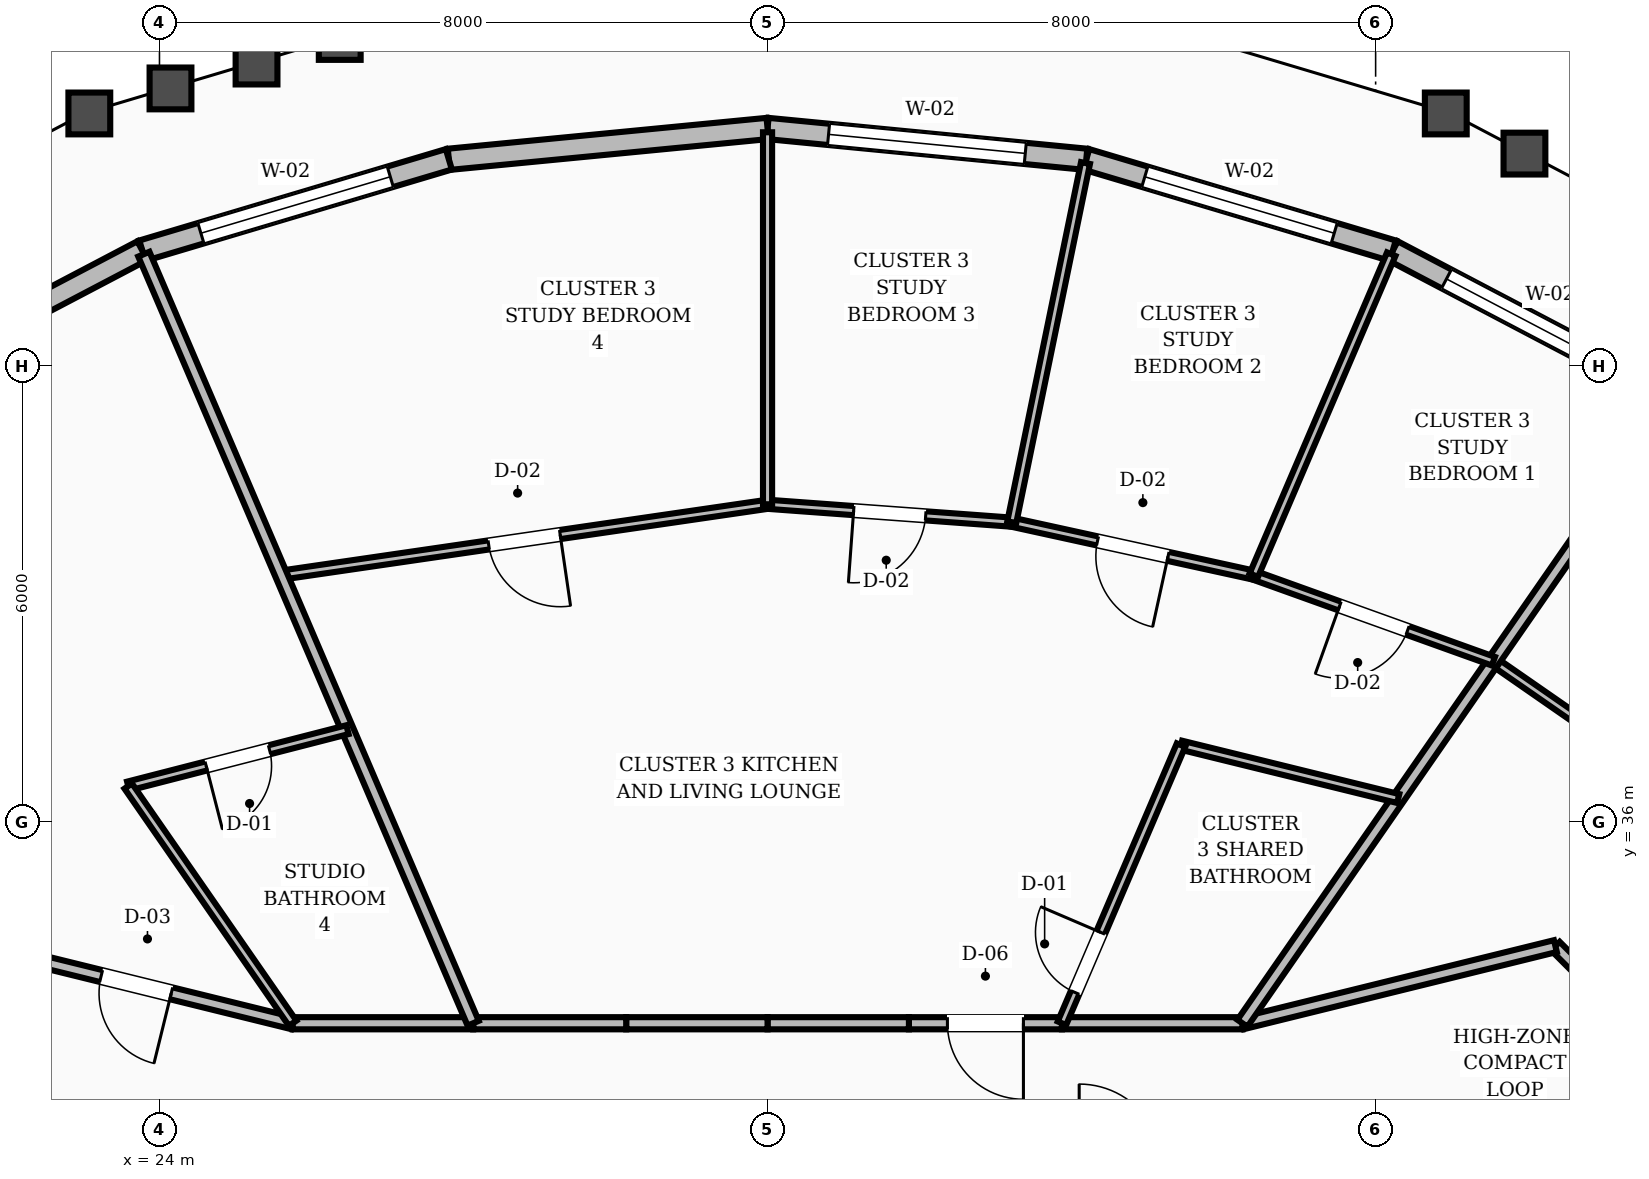
"""IFC4 building model, lengths in metres.
Left out: names, types, materials, properties, quantities, classifications, styles, units other than length and angle.
Written with IfcOpenShell. Run it as: python <this file> out.ifc"""

import sys

from ifc_helpers import new_model, si_unit, direction, frame, frame_2d, origin, place, context, subcontext, project, spatial, rectangle, extrude, element, fill, save


model = new_model("IFC4")
c1 = context("Model", 3, precision=1e-05, world=origin(), true_north=direction((0.0, 1.0)))
c2 = subcontext(c1, "Body", "Model", "MODEL_VIEW")
j1 = project(units=[si_unit("LENGTHUNIT", "METRE"), si_unit("PLANEANGLEUNIT", "RADIAN")], contexts=[c1])
p1 = place(None, origin())
s1 = spatial("IfcSite", under=j1, at=p1, CompositionType="ELEMENT")
p2 = place(p1, origin())
s2 = spatial("IfcBuilding", under=s1, at=p2, CompositionType="ELEMENT")
p3 = place(p2, frame((0.0, 0.0, 243.6)))
s3 = spatial("IfcBuildingStorey", under=s2, at=p3, CompositionType="ELEMENT", Elevation=243.6)
p4 = place(p3, frame((43.941, 41.562, 0.0), z_axis=(0.0, 0.0, 1.0), x_axis=(-0.885290153249, 0.46503907853, 0.0)))
e1 = element("IfcWall", 1, at=p4, inside=s3, PredefinedType="STANDARD", context=c2, shape_type="SweptSolid", body=[
    extrude(rectangle(XDim=4.197, YDim=0.28, at=frame_2d((2.099, 0.0))), origin(), (0.0, 0.0, 1.0), 2.88),
])
p5 = place(p4, frame((0.799, 0.0, 0.8)))
e2 = element("IfcOpeningElement", 2, at=p5, cuts=e1, PredefinedType="OPENING", context=c2, shape_type="SweptSolid", body=[
    extrude(rectangle(XDim=2.6, YDim=1.65, at=frame_2d((1.3, 0.825))), frame((0.0, 0.15, 0.0), z_axis=(0.0, -1.0, 0.0), x_axis=(1.0, 0.0, 0.0)), (0.0, 0.0, 1.0), 0.3),
])
p6 = place(p3, frame((40.225, 43.514, 0.0), z_axis=(0.0, 0.0, 1.0), x_axis=(-0.958312014412, 0.285723788009, 0.0)))
e3 = element("IfcWall", 3, at=p6, inside=s3, PredefinedType="STANDARD", context=c2, shape_type="SweptSolid", body=[
    extrude(rectangle(XDim=4.207, YDim=0.28, at=frame_2d((2.104, 0.0))), origin(), (0.0, 0.0, 1.0), 2.88),
])
p7 = place(p6, frame((0.804, 0.0, 0.8)))
e4 = element("IfcOpeningElement", 4, at=p7, cuts=e3, PredefinedType="OPENING", context=c2, shape_type="SweptSolid", body=[
    extrude(rectangle(XDim=2.6, YDim=1.65, at=frame_2d((1.3, 0.825))), frame((0.0, 0.15, 0.0), z_axis=(0.0, -1.0, 0.0), x_axis=(1.0, 0.0, 0.0)), (0.0, 0.0, 1.0), 0.3),
])
p8 = place(p3, frame((36.193, 44.716, 0.0), z_axis=(0.0, 0.0, 1.0), x_axis=(-0.995350551252, 0.096318638497, 0.0)))
e5 = element("IfcWall", 5, at=p8, inside=s3, PredefinedType="STANDARD", context=c2, shape_type="SweptSolid", body=[
    extrude(rectangle(XDim=4.213, YDim=0.28, at=frame_2d((2.106, 0.0))), origin(), (0.0, 0.0, 1.0), 2.88),
])
p9 = place(p8, frame((0.806, 0.0, 0.8)))
e6 = element("IfcOpeningElement", 6, at=p9, cuts=e5, PredefinedType="OPENING", context=c2, shape_type="SweptSolid", body=[
    extrude(rectangle(XDim=2.6, YDim=1.65, at=frame_2d((1.3, 0.825))), frame((0.0, 0.15, 0.0), z_axis=(0.0, -1.0, 0.0), x_axis=(1.0, 0.0, 0.0)), (0.0, 0.0, 1.0), 0.3),
])
p10 = place(p3, frame((32.0, 45.122, 0.0), z_axis=(0.0, 0.0, 1.0), x_axis=(-0.995350551252, -0.096318638497, 0.0)))
e7 = element("IfcWall", 7, at=p10, inside=s3, PredefinedType="STANDARD", context=c2, shape_type="SweptSolid", body=[
    extrude(rectangle(XDim=4.213, YDim=0.28, at=frame_2d((2.106, 0.0))), origin(), (0.0, 0.0, 1.0), 2.88),
])
p11 = place(p3, frame((27.807, 44.716, 0.0), z_axis=(0.0, 0.0, 1.0), x_axis=(-0.958312014412, -0.285723788009, 0.0)))
e8 = element("IfcWall", 8, at=p11, inside=s3, PredefinedType="STANDARD", context=c2, shape_type="SweptSolid", body=[
    extrude(rectangle(XDim=4.207, YDim=0.28, at=frame_2d((2.104, 0.0))), origin(), (0.0, 0.0, 1.0), 2.88),
])
p12 = place(p11, frame((0.804, 0.0, 0.8)))
e9 = element("IfcOpeningElement", 9, at=p12, cuts=e8, PredefinedType="OPENING", context=c2, shape_type="SweptSolid", body=[
    extrude(rectangle(XDim=2.6, YDim=1.65, at=frame_2d((1.3, 0.825))), frame((0.0, 0.15, 0.0), z_axis=(0.0, -1.0, 0.0), x_axis=(1.0, 0.0, 0.0)), (0.0, 0.0, 1.0), 0.3),
])
p13 = place(p3, frame((23.775, 43.514, 0.0), z_axis=(0.0, 0.0, 1.0), x_axis=(-0.885290153249, -0.46503907853, 0.0)))
e10 = element("IfcWall", 10, at=p13, inside=s3, PredefinedType="STANDARD", context=c2, shape_type="SweptSolid", body=[
    extrude(rectangle(XDim=4.197, YDim=0.28, at=frame_2d((2.099, 0.0))), origin(), (0.0, 0.0, 1.0), 2.88),
])
p14 = place(p3, frame((44.427, 32.303, 0.0), z_axis=(0.0, 0.0, 1.0), x_axis=(-0.707106781187, 0.707106781187, 0.0)))
e11 = element("IfcWall", 11, at=p14, inside=s3, PredefinedType="SOLIDWALL", context=c2, shape_type="SweptSolid", body=[
    extrude(rectangle(XDim=2.916, YDim=0.16, at=frame_2d((1.458, 0.0))), origin(), (0.0, 0.0, 1.0), 2.87),
])
p15 = place(p3, frame((42.365, 34.365, 0.0), z_axis=(0.0, 0.0, 1.0), x_axis=(-0.970939799552, -0.239323850978, 0.0)))
e12 = element("IfcWall", 12, at=p15, inside=s3, PredefinedType="SOLIDWALL", context=c2, shape_type="SweptSolid", body=[
    extrude(rectangle(XDim=4.241, YDim=0.16, at=frame_2d((2.12, 0.0))), origin(), (0.0, 0.0, 1.0), 2.87),
])
p16 = place(p3, frame((38.248, 33.35, 0.0), z_axis=(0.0, 0.0, 1.0), x_axis=(-1.0, 0.0, 0.0)))
e13 = element("IfcWall", 13, at=p16, inside=s3, PredefinedType="SOLIDWALL", context=c2, shape_type="SweptSolid", body=[
    extrude(rectangle(XDim=2.375, YDim=0.16, at=frame_2d((1.188, 0.0))), origin(), (0.0, 0.0, 1.0), 2.87),
])
p17 = place(p3, frame((35.873, 33.35, 0.0), z_axis=(0.0, 0.0, 1.0), x_axis=(-1.0, 0.0, 0.0)))
e14 = element("IfcWall", 14, at=p17, inside=s3, PredefinedType="SOLIDWALL", context=c2, shape_type="SweptSolid", body=[
    extrude(rectangle(XDim=2.013, YDim=0.16, at=frame_2d((1.006, 0.0))), origin(), (0.0, 0.0, 1.0), 2.87),
])
p18 = place(p17, frame((0.507, 0.0, 0.0)))
e15 = element("IfcOpeningElement", 15, at=p18, cuts=e14, PredefinedType="OPENING", context=c2, shape_type="SweptSolid", body=[
    extrude(rectangle(XDim=1.0, YDim=2.1, at=frame_2d((0.5, 1.05))), frame((0.0, 0.09, 0.0), z_axis=(0.0, -1.0, 0.0), x_axis=(1.0, 0.0, 0.0)), (0.0, 0.0, 1.0), 0.18),
])
for number, where, z_axis, x_axis in (
    (16, (33.86, 33.35, 0.0), (0.0, 0.0, 1.0), (-1.0, 0.0, 0.0)),
    (17, (32.0, 33.35, 0.0), (0.0, 0.0, 1.0), (-1.0, 0.0, 0.0)),
):
    element("IfcWall", number, at=place(p3, frame(where, z_axis=z_axis, x_axis=x_axis)), inside=s3, PredefinedType="SOLIDWALL", context=c2, shape_type="SweptSolid", body=[
        extrude(rectangle(XDim=1.86, YDim=0.16, at=frame_2d((0.93, 0.0))), origin(), (0.0, 0.0, 1.0), 2.87),
    ])
p19 = place(p3, frame((30.14, 33.35, 0.0), z_axis=(0.0, 0.0, 1.0), x_axis=(-1.0, 0.0, 0.0)))
e18 = element("IfcWall", 18, at=p19, inside=s3, PredefinedType="SOLIDWALL", context=c2, shape_type="SweptSolid", body=[
    extrude(rectangle(XDim=2.013, YDim=0.16, at=frame_2d((1.006, 0.0))), origin(), (0.0, 0.0, 1.0), 2.87),
])
p20 = place(p3, frame((28.127, 33.35, 0.0), z_axis=(0.0, 0.0, 1.0), x_axis=(-1.0, 0.0, 0.0)))
e19 = element("IfcWall", 19, at=p20, inside=s3, PredefinedType="SOLIDWALL", context=c2, shape_type="SweptSolid", body=[
    extrude(rectangle(XDim=2.375, YDim=0.16, at=frame_2d((1.188, 0.0))), origin(), (0.0, 0.0, 1.0), 2.87),
])
p21 = place(p3, frame((25.752, 33.35, 0.0), z_axis=(0.0, 0.0, 1.0), x_axis=(-0.970939799552, 0.239323850978, 0.0)))
e20 = element("IfcWall", 20, at=p21, inside=s3, PredefinedType="SOLIDWALL", context=c2, shape_type="SweptSolid", body=[
    extrude(rectangle(XDim=4.241, YDim=0.16, at=frame_2d((2.12, 0.0))), origin(), (0.0, 0.0, 1.0), 2.87),
])
p22 = place(p21, frame((1.646, 0.0, 0.0)))
e21 = element("IfcOpeningElement", 21, at=p22, cuts=e20, PredefinedType="OPENING", context=c2, shape_type="SweptSolid", body=[
    extrude(rectangle(XDim=0.95, YDim=2.1, at=frame_2d((0.475, 1.05))), frame((0.0, 0.09, 0.0), z_axis=(0.0, -1.0, 0.0), x_axis=(1.0, 0.0, 0.0)), (0.0, 0.0, 1.0), 0.18),
])
p23 = place(p3, frame((47.314, 34.113, 0.0), z_axis=(0.0, 0.0, 1.0), x_axis=(-0.821574143978, 0.570101680358, 0.0)))
e22 = element("IfcWall", 22, at=p23, inside=s3, PredefinedType="PARTITIONING", context=c2, shape_type="SweptSolid", body=[
    extrude(rectangle(XDim=7.016, YDim=0.12, at=frame_2d((3.508, 0.0))), origin(), (0.0, 0.0, 1.0), 2.87),
])
p24 = place(p23, frame((3.033, 0.0, 0.0)))
e23 = element("IfcOpeningElement", 23, at=p24, cuts=e22, PredefinedType="OPENING", context=c2, shape_type="SweptSolid", body=[
    extrude(rectangle(XDim=0.95, YDim=2.1, at=frame_2d((0.475, 1.05))), frame((0.0, 0.07, 0.0), z_axis=(0.0, -1.0, 0.0), x_axis=(1.0, 0.0, 0.0)), (0.0, 0.0, 1.0), 0.14),
])
p25 = place(p3, frame((38.248, 33.35, 0.0), z_axis=(0.0, 0.0, 1.0), x_axis=(0.56977166182, 0.821803050242, 0.0)))
e24 = element("IfcWall", 24, at=p25, inside=s3, PredefinedType="SOLIDWALL", context=c2, shape_type="SweptSolid", body=[
    extrude(rectangle(XDim=9.943, YDim=0.16, at=frame_2d((4.971, 0.0))), origin(), (0.0, 0.0, 1.0), 2.87),
])
p26 = place(p3, frame((40.297, 36.306, 0.0), z_axis=(0.0, 0.0, 1.0), x_axis=(-0.971072323886, 0.238785556061, 0.0)))
e25 = element("IfcWall", 25, at=p26, inside=s3, PredefinedType="PARTITIONING", context=c2, shape_type="SweptSolid", body=[
    extrude(rectangle(XDim=2.943, YDim=0.12, at=frame_2d((1.471, 0.0))), origin(), (0.0, 0.0, 1.0), 2.87),
])
p27 = place(p3, frame((35.873, 33.35, 0.0), z_axis=(0.0, 0.0, 1.0), x_axis=(0.393660187427, 0.919256034429, 0.0)))
e26 = element("IfcWall", 26, at=p27, inside=s3, PredefinedType="PARTITIONING", context=c2, shape_type="SweptSolid", body=[
    extrude(rectangle(XDim=3.98, YDim=0.12, at=frame_2d((1.99, 0.0))), origin(), (0.0, 0.0, 1.0), 2.87),
])
p28 = place(p27, frame((0.44, 0.0, 0.0)))
e27 = element("IfcOpeningElement", 27, at=p28, cuts=e26, PredefinedType="OPENING", context=c2, shape_type="SweptSolid", body=[
    extrude(rectangle(XDim=0.86, YDim=2.1, at=frame_2d((0.43, 1.05))), frame((0.0, 0.07, 0.0), z_axis=(0.0, -1.0, 0.0), x_axis=(1.0, 0.0, 0.0)), (0.0, 0.0, 1.0), 0.14),
])
p29 = place(p3, frame((41.55, 38.113, 0.0), z_axis=(0.0, 0.0, 1.0), x_axis=(-0.94115841408, 0.337965737326, 0.0)))
e28 = element("IfcWall", 28, at=p29, inside=s3, PredefinedType="PARTITIONING", context=c2, shape_type="SweptSolid", body=[
    extrude(rectangle(XDim=3.35, YDim=0.12, at=frame_2d((1.675, 0.0))), origin(), (0.0, 0.0, 1.0), 2.87),
])
p30 = place(p29, frame((1.2, 0.0, 0.0)))
e29 = element("IfcOpeningElement", 29, at=p30, cuts=e28, PredefinedType="OPENING", context=c2, shape_type="SweptSolid", body=[
    extrude(rectangle(XDim=0.95, YDim=2.1, at=frame_2d((0.475, 1.05))), frame((0.0, 0.07, 0.0), z_axis=(0.0, -1.0, 0.0), x_axis=(1.0, 0.0, 0.0)), (0.0, 0.0, 1.0), 0.14),
])
p31 = place(p3, frame((38.397, 39.245, 0.0), z_axis=(0.0, 0.0, 1.0), x_axis=(-0.976852106819, 0.213915781098, 0.0)))
e30 = element("IfcWall", 30, at=p31, inside=s3, PredefinedType="PARTITIONING", context=c2, shape_type="SweptSolid", body=[
    extrude(rectangle(XDim=3.26, YDim=0.12, at=frame_2d((1.63, 0.0))), origin(), (0.0, 0.0, 1.0), 2.87),
])
p32 = place(p31, frame((1.155, 0.0, 0.0)))
e31 = element("IfcOpeningElement", 31, at=p32, cuts=e30, PredefinedType="OPENING", context=c2, shape_type="SweptSolid", body=[
    extrude(rectangle(XDim=0.95, YDim=2.1, at=frame_2d((0.475, 1.05))), frame((0.0, 0.07, 0.0), z_axis=(0.0, -1.0, 0.0), x_axis=(1.0, 0.0, 0.0)), (0.0, 0.0, 1.0), 0.14),
])
p33 = place(p3, frame((38.397, 39.245, 0.0), z_axis=(0.0, 0.0, 1.0), x_axis=(0.393604976549, 0.919279675853, 0.0)))
e32 = element("IfcWall", 32, at=p33, inside=s3, PredefinedType="PARTITIONING", context=c2, shape_type="SweptSolid", body=[
    extrude(rectangle(XDim=4.594, YDim=0.12, at=frame_2d((2.297, 0.0))), origin(), (0.0, 0.0, 1.0), 2.87),
])
p34 = place(p3, frame((35.213, 39.942, 0.0), z_axis=(0.0, 0.0, 1.0), x_axis=(-0.997333723592, 0.072975638312, 0.0)))
e33 = element("IfcWall", 33, at=p34, inside=s3, PredefinedType="PARTITIONING", context=c2, shape_type="SweptSolid", body=[
    extrude(rectangle(XDim=3.222, YDim=0.12, at=frame_2d((1.611, 0.0))), origin(), (0.0, 0.0, 1.0), 2.87),
])
p35 = place(p34, frame((1.136, 0.0, 0.0)))
e34 = element("IfcOpeningElement", 34, at=p35, cuts=e33, PredefinedType="OPENING", context=c2, shape_type="SweptSolid", body=[
    extrude(rectangle(XDim=0.95, YDim=2.1, at=frame_2d((0.475, 1.05))), frame((0.0, 0.07, 0.0), z_axis=(0.0, -1.0, 0.0), x_axis=(1.0, 0.0, 0.0)), (0.0, 0.0, 1.0), 0.14),
])
p36 = place(p3, frame((35.213, 39.942, 0.0), z_axis=(0.0, 0.0, 1.0), x_axis=(0.201107301766, 0.979569218165, 0.0)))
e35 = element("IfcWall", 35, at=p36, inside=s3, PredefinedType="PARTITIONING", context=c2, shape_type="SweptSolid", body=[
    extrude(rectangle(XDim=4.823, YDim=0.12, at=frame_2d((2.412, 0.0))), origin(), (0.0, 0.0, 1.0), 2.87),
])
p37 = place(p3, frame((32.0, 40.177, 0.0), z_axis=(0.0, 0.0, 1.0), x_axis=(-0.989545223303, -0.144222921337, 0.0)))
e36 = element("IfcWall", 36, at=p37, inside=s3, PredefinedType="PARTITIONING", context=c2, shape_type="SweptSolid", body=[
    extrude(rectangle(XDim=6.465, YDim=0.12, at=frame_2d((3.232, 0.0))), origin(), (0.0, 0.0, 1.0), 2.87),
])
p38 = place(p37, frame((2.757, 0.0, 0.0)))
e37 = element("IfcOpeningElement", 37, at=p38, cuts=e36, PredefinedType="OPENING", context=c2, shape_type="SweptSolid", body=[
    extrude(rectangle(XDim=0.95, YDim=2.1, at=frame_2d((0.475, 1.05))), frame((0.0, 0.07, 0.0), z_axis=(0.0, -1.0, 0.0), x_axis=(1.0, 0.0, 0.0)), (0.0, 0.0, 1.0), 0.14),
])
p39 = place(p3, frame((32.0, 40.177, 0.0), z_axis=(0.0, 0.0, 1.0), x_axis=(0.0, 1.0, 0.0)))
e38 = element("IfcWall", 38, at=p39, inside=s3, PredefinedType="PARTITIONING", context=c2, shape_type="SweptSolid", body=[
    extrude(rectangle(XDim=4.894, YDim=0.12, at=frame_2d((2.447, 0.0))), origin(), (0.0, 0.0, 1.0), 2.87),
])
p40 = place(p3, frame((28.127, 33.35, 0.0), z_axis=(0.0, 0.0, 1.0), x_axis=(-0.393632832197, 0.919267748492, 0.0)))
e39 = element("IfcWall", 39, at=p40, inside=s3, PredefinedType="SOLIDWALL", context=c2, shape_type="SweptSolid", body=[
    extrude(rectangle(XDim=11.007, YDim=0.16, at=frame_2d((5.503, 0.0))), origin(), (0.0, 0.0, 1.0), 2.87),
])
p41 = place(p3, frame((26.473, 37.212, 0.0), z_axis=(0.0, 0.0, 1.0), x_axis=(-0.96849067282, -0.249049827665, 0.0)))
e40 = element("IfcWall", 40, at=p41, inside=s3, PredefinedType="PARTITIONING", context=c2, shape_type="SweptSolid", body=[
    extrude(rectangle(XDim=2.978, YDim=0.12, at=frame_2d((1.489, 0.0))), origin(), (0.0, 0.0, 1.0), 2.87),
])
p42 = place(p41, frame((1.059, 0.0, 0.0)))
e41 = element("IfcOpeningElement", 41, at=p42, cuts=e40, PredefinedType="OPENING", context=c2, shape_type="SweptSolid", body=[
    extrude(rectangle(XDim=0.86, YDim=2.1, at=frame_2d((0.43, 1.05))), frame((0.0, 0.07, 0.0), z_axis=(0.0, -1.0, 0.0), x_axis=(1.0, 0.0, 0.0)), (0.0, 0.0, 1.0), 0.14),
])
p43 = place(p3, frame((25.752, 33.35, 0.0), z_axis=(0.0, 0.0, 1.0), x_axis=(-0.569728092648, 0.821833255866, 0.0)))
e42 = element("IfcWall", 42, at=p43, inside=s3, PredefinedType="PARTITIONING", context=c2, shape_type="SweptSolid", body=[
    extrude(rectangle(XDim=3.797, YDim=0.12, at=frame_2d((1.898, 0.0))), origin(), (0.0, 0.0, 1.0), 2.87),
])
p44 = place(p5, origin())
e43 = element("IfcWindow", 43, at=p44, inside=s3, PartitioningType="SINGLE_PANEL", PredefinedType="WINDOW", context=c2, shape_type="SweptSolid", body=[
    extrude(rectangle(XDim=2.6, YDim=1.65, at=frame_2d((1.3, 0.825))), frame((0.0, 0.03, 0.0), z_axis=(0.0, -1.0, 0.0), x_axis=(1.0, 0.0, 0.0)), (0.0, 0.0, 1.0), 0.06),
])
fill(e2, e43)
p45 = place(p7, origin())
e44 = element("IfcWindow", 44, at=p45, inside=s3, PartitioningType="SINGLE_PANEL", PredefinedType="WINDOW", context=c2, shape_type="SweptSolid", body=[
    extrude(rectangle(XDim=2.6, YDim=1.65, at=frame_2d((1.3, 0.825))), frame((0.0, 0.03, 0.0), z_axis=(0.0, -1.0, 0.0), x_axis=(1.0, 0.0, 0.0)), (0.0, 0.0, 1.0), 0.06),
])
fill(e4, e44)
p46 = place(p9, origin())
e45 = element("IfcWindow", 45, at=p46, inside=s3, PartitioningType="SINGLE_PANEL", PredefinedType="WINDOW", context=c2, shape_type="SweptSolid", body=[
    extrude(rectangle(XDim=2.6, YDim=1.65, at=frame_2d((1.3, 0.825))), frame((0.0, 0.03, 0.0), z_axis=(0.0, -1.0, 0.0), x_axis=(1.0, 0.0, 0.0)), (0.0, 0.0, 1.0), 0.06),
])
fill(e6, e45)
p47 = place(p12, origin())
e46 = element("IfcWindow", 46, at=p47, inside=s3, PartitioningType="SINGLE_PANEL", PredefinedType="WINDOW", context=c2, shape_type="SweptSolid", body=[
    extrude(rectangle(XDim=2.6, YDim=1.65, at=frame_2d((1.3, 0.825))), frame((0.0, 0.03, 0.0), z_axis=(0.0, -1.0, 0.0), x_axis=(1.0, 0.0, 0.0)), (0.0, 0.0, 1.0), 0.06),
])
fill(e9, e46)
p48 = place(p28, origin())
e47 = element("IfcDoor", 47, at=p48, inside=s3, OperationType="SINGLE_SWING_RIGHT", PredefinedType="DOOR", context=c2, shape_type="SweptSolid", body=[
    extrude(rectangle(XDim=0.86, YDim=2.1, at=frame_2d((0.43, 1.05))), frame((0.0, 0.025, 0.0), z_axis=(0.0, -1.0, 0.0), x_axis=(1.0, 0.0, 0.0)), (0.0, 0.0, 1.0), 0.05),
])
fill(e27, e47)
p49 = place(p18, origin())
e48 = element("IfcDoor", 48, at=p49, inside=s3, OperationType="SINGLE_SWING_LEFT", PredefinedType="DOOR", context=c2, shape_type="SweptSolid", body=[
    extrude(rectangle(XDim=1.0, YDim=2.1, at=frame_2d((0.5, 1.05))), frame((0.0, 0.025, 0.0), z_axis=(0.0, -1.0, 0.0), x_axis=(1.0, 0.0, 0.0)), (0.0, 0.0, 1.0), 0.05),
])
fill(e15, e48)
p50 = place(p30, origin())
e49 = element("IfcDoor", 49, at=p50, inside=s3, OperationType="SINGLE_SWING_RIGHT", PredefinedType="DOOR", context=c2, shape_type="SweptSolid", body=[
    extrude(rectangle(XDim=0.95, YDim=2.1, at=frame_2d((0.475, 1.05))), frame((0.0, 0.025, 0.0), z_axis=(0.0, -1.0, 0.0), x_axis=(1.0, 0.0, 0.0)), (0.0, 0.0, 1.0), 0.05),
])
fill(e29, e49)
p51 = place(p32, origin())
e50 = element("IfcDoor", 50, at=p51, inside=s3, OperationType="SINGLE_SWING_LEFT", PredefinedType="DOOR", context=c2, shape_type="SweptSolid", body=[
    extrude(rectangle(XDim=0.95, YDim=2.1, at=frame_2d((0.475, 1.05))), frame((0.0, 0.025, 0.0), z_axis=(0.0, -1.0, 0.0), x_axis=(1.0, 0.0, 0.0)), (0.0, 0.0, 1.0), 0.05),
])
fill(e31, e50)
p52 = place(p35, origin())
e51 = element("IfcDoor", 51, at=p52, inside=s3, OperationType="SINGLE_SWING_RIGHT", PredefinedType="DOOR", context=c2, shape_type="SweptSolid", body=[
    extrude(rectangle(XDim=0.95, YDim=2.1, at=frame_2d((0.475, 1.05))), frame((0.0, 0.025, 0.0), z_axis=(0.0, -1.0, 0.0), x_axis=(1.0, 0.0, 0.0)), (0.0, 0.0, 1.0), 0.05),
])
fill(e34, e51)
p53 = place(p38, origin())
e52 = element("IfcDoor", 52, at=p53, inside=s3, OperationType="SINGLE_SWING_LEFT", PredefinedType="DOOR", context=c2, shape_type="SweptSolid", body=[
    extrude(rectangle(XDim=0.95, YDim=2.1, at=frame_2d((0.475, 1.05))), frame((0.0, 0.025, 0.0), z_axis=(0.0, -1.0, 0.0), x_axis=(1.0, 0.0, 0.0)), (0.0, 0.0, 1.0), 0.05),
])
fill(e37, e52)
p54 = place(p42, origin())
e53 = element("IfcDoor", 53, at=p54, inside=s3, OperationType="SINGLE_SWING_RIGHT", PredefinedType="DOOR", context=c2, shape_type="SweptSolid", body=[
    extrude(rectangle(XDim=0.86, YDim=2.1, at=frame_2d((0.43, 1.05))), frame((0.0, 0.025, 0.0), z_axis=(0.0, -1.0, 0.0), x_axis=(1.0, 0.0, 0.0)), (0.0, 0.0, 1.0), 0.05),
])
fill(e41, e53)
p55 = place(p22, origin())
e54 = element("IfcDoor", 54, at=p55, inside=s3, OperationType="SINGLE_SWING_LEFT", PredefinedType="DOOR", context=c2, shape_type="SweptSolid", body=[
    extrude(rectangle(XDim=0.95, YDim=2.1, at=frame_2d((0.475, 1.05))), frame((0.0, 0.025, 0.0), z_axis=(0.0, -1.0, 0.0), x_axis=(1.0, 0.0, 0.0)), (0.0, 0.0, 1.0), 0.05),
])
fill(e21, e54)
save(model, sys.argv[1])
